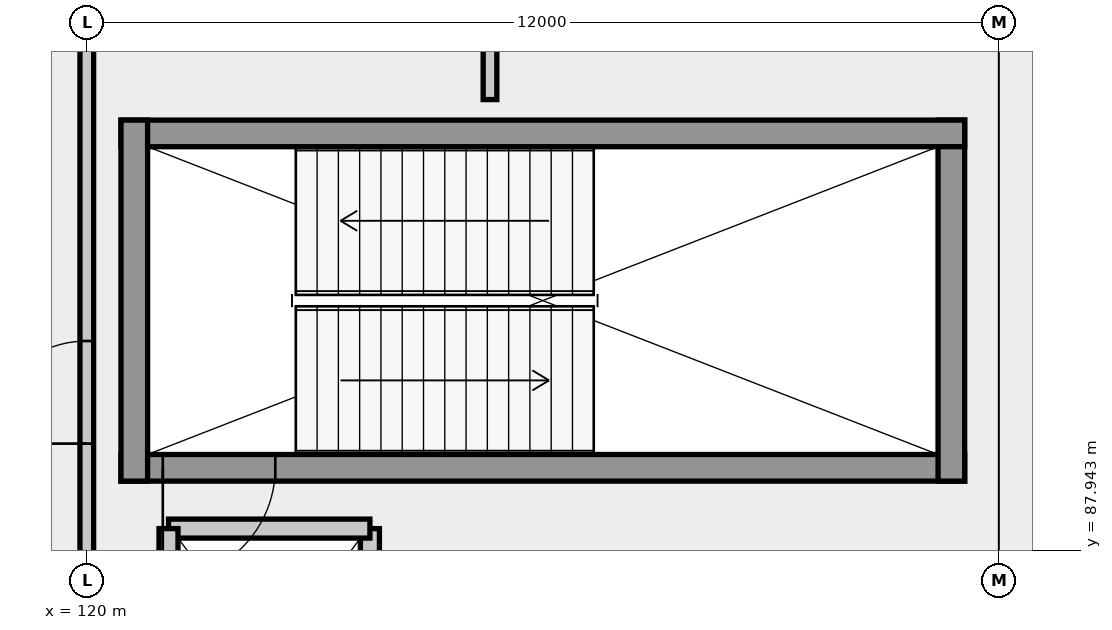
"""IFC4 building model, lengths in metres.
Left out: names, types, materials, properties, quantities, classifications, styles, units other than length and angle.
Written with IfcOpenShell. Run it as: python <this file> out.ifc"""

import sys

from ifc_helpers import new_model, si_unit, direction, frame, frame_2d, origin, place, context, subcontext, project, spatial, rectangle, extrude, element, fill, save


model = new_model("IFC4")
c1 = context("Model", 3, precision=1e-05, world=origin(), true_north=direction((0.0, 1.0)))
c2 = subcontext(c1, "Body", "Model", "MODEL_VIEW")
j1 = project(units=[si_unit("LENGTHUNIT", "METRE"), si_unit("PLANEANGLEUNIT", "RADIAN")], contexts=[c1])
p1 = place(None, origin())
s1 = spatial("IfcSite", under=j1, at=p1, CompositionType="ELEMENT")
p2 = place(p1, origin())
s2 = spatial("IfcBuilding", under=s1, at=p2, CompositionType="ELEMENT")
p3 = place(p2, origin())
s3 = spatial("IfcBuildingStorey", under=s2, at=p3, CompositionType="ELEMENT", Elevation=0.0)
p4 = place(p3, frame((120.45, 89.025, 0.0), z_axis=(0.0, 0.0, 1.0), x_axis=(1.0, 0.0, 0.0)))
e1 = element("IfcWall", 1, at=p4, inside=s3, PredefinedType="SHEAR", context=c2, shape_type="SweptSolid", body=[
    extrude(rectangle(XDim=11.1, YDim=0.35, at=frame_2d((5.55, 0.0))), origin(), (0.0, 0.0, 1.0), 5.14),
])
p5 = place(p4, frame((0.55, 0.0, 0.0)))
e2 = element("IfcOpeningElement", 2, at=p5, cuts=e1, PredefinedType="OPENING", context=c2, shape_type="SweptSolid", body=[
    extrude(rectangle(XDim=1.48, YDim=2.3, at=frame_2d((0.74, 1.15))), frame((0.0, 0.185, 0.0), z_axis=(0.0, -1.0, 0.0), x_axis=(1.0, 0.0, 0.0)), (0.0, 0.0, 1.0), 0.37),
])
p6 = place(p3, frame((131.375, 88.85, 0.0), z_axis=(0.0, 0.0, 1.0), x_axis=(0.0, 1.0, 0.0)))
e3 = element("IfcWall", 3, at=p6, inside=s3, PredefinedType="SHEAR", context=c2, shape_type="SweptSolid", body=[
    extrude(rectangle(XDim=4.75, YDim=0.35, at=frame_2d((2.375, 0.0))), origin(), (0.0, 0.0, 1.0), 5.14),
])
p7 = place(p3, frame((131.55, 93.425, 0.0), z_axis=(0.0, 0.0, 1.0), x_axis=(-1.0, 0.0, 0.0)))
e4 = element("IfcWall", 4, at=p7, inside=s3, PredefinedType="SHEAR", context=c2, shape_type="SweptSolid", body=[
    extrude(rectangle(XDim=11.1, YDim=0.35, at=frame_2d((5.55, 0.0))), origin(), (0.0, 0.0, 1.0), 5.14),
])
p8 = place(p3, frame((120.625, 93.6, 0.0), z_axis=(0.0, 0.0, 1.0), x_axis=(0.0, -1.0, 0.0)))
e5 = element("IfcWall", 5, at=p8, inside=s3, PredefinedType="SHEAR", context=c2, shape_type="SweptSolid", body=[
    extrude(rectangle(XDim=4.75, YDim=0.35, at=frame_2d((2.375, 0.0))), origin(), (0.0, 0.0, 1.0), 5.14),
])
p9 = place(p3, frame((123.725, 84.775, 0.0), z_axis=(0.0, 0.0, 1.0), x_axis=(0.0, 1.0, 0.0)))
e6 = element("IfcWall", 6, at=p9, inside=s3, PredefinedType="SOLIDWALL", context=c2, shape_type="SweptSolid", body=[
    extrude(rectangle(XDim=3.45, YDim=0.25, at=frame_2d((1.725, 0.0))), origin(), (0.0, 0.0, 1.0), 5.14),
])
p10 = place(p9, frame((1.1, 0.0, 0.0)))
e7 = element("IfcOpeningElement", 7, at=p10, cuts=e6, PredefinedType="OPENING", context=c2, shape_type="SweptSolid", body=[
    extrude(rectangle(XDim=1.25, YDim=2.25, at=frame_2d((0.625, 1.125))), frame((0.0, 0.135, 0.0), z_axis=(0.0, -1.0, 0.0), x_axis=(1.0, 0.0, 0.0)), (0.0, 0.0, 1.0), 0.27),
])
p11 = place(p3, frame((123.725, 88.225, 0.0), z_axis=(0.0, 0.0, 1.0), x_axis=(-1.0, 0.0, 0.0)))
e8 = element("IfcWall", 8, at=p11, inside=s3, PredefinedType="SOLIDWALL", context=c2, shape_type="SweptSolid", body=[
    extrude(rectangle(XDim=2.65, YDim=0.25, at=frame_2d((1.325, 0.0))), origin(), (0.0, 0.0, 1.0), 5.14),
])
p12 = place(p3, frame((121.075, 88.225, 0.0), z_axis=(0.0, 0.0, 1.0), x_axis=(0.0, -1.0, 0.0)))
e9 = element("IfcWall", 9, at=p12, inside=s3, PredefinedType="SOLIDWALL", context=c2, shape_type="SweptSolid", body=[
    extrude(rectangle(XDim=3.45, YDim=0.25, at=frame_2d((1.725, 0.0))), origin(), (0.0, 0.0, 1.0), 5.14),
])
p13 = place(p3, frame((120.0, 84.594, 0.0), z_axis=(0.0, 0.0, 1.0), x_axis=(0.0, 1.0, 0.0)))
e10 = element("IfcWall", 10, at=p13, inside=s3, PredefinedType="PARTITIONING", context=c2, shape_type="SweptSolid", body=[
    extrude(rectangle(XDim=10.848, YDim=0.18, at=frame_2d((5.424, 0.0))), origin(), (0.0, 0.0, 1.0), 4.73),
])
p14 = place(p13, frame((4.749, 0.0, 0.0)))
e11 = element("IfcOpeningElement", 11, at=p14, cuts=e10, PredefinedType="OPENING", context=c2, shape_type="SweptSolid", body=[
    extrude(rectangle(XDim=1.35, YDim=2.3, at=frame_2d((0.675, 1.15))), frame((0.0, 0.1, 0.0), z_axis=(0.0, -1.0, 0.0), x_axis=(1.0, 0.0, 0.0)), (0.0, 0.0, 1.0), 0.2),
])
p15 = place(p3, frame((125.305, 93.87, 0.0), z_axis=(0.0, 0.0, 1.0), x_axis=(0.0, 1.0, 0.0)))
e12 = element("IfcWall", 12, at=p15, inside=s3, PredefinedType="PARTITIONING", context=c2, shape_type="SweptSolid", body=[
    extrude(rectangle(XDim=2.61, YDim=0.18, at=frame_2d((1.305, 0.0))), origin(), (0.0, 0.0, 1.0), 4.53),
])
p16 = place(p15, frame((0.65, 0.0, 0.0)))
e13 = element("IfcOpeningElement", 13, at=p16, cuts=e12, PredefinedType="OPENING", context=c2, shape_type="SweptSolid", body=[
    extrude(rectangle(XDim=1.15, YDim=2.25, at=frame_2d((0.575, 1.125))), frame((0.0, 0.1, 0.0), z_axis=(0.0, -1.0, 0.0), x_axis=(1.0, 0.0, 0.0)), (0.0, 0.0, 1.0), 0.2),
])
p17 = place(p5, frame((1.48, 0.0, 0.0), z_axis=(0.0, 0.0, 1.0), x_axis=(-1.0, 0.0, 0.0)))
e14 = element("IfcDoor", 14, at=p17, inside=s3, OperationType="DOUBLE_DOOR_SINGLE_SWING", PredefinedType="DOOR", context=c2, shape_type="SweptSolid", body=[
    extrude(rectangle(XDim=1.48, YDim=2.3, at=frame_2d((0.74, 1.15))), frame((0.0, 0.025, 0.0), z_axis=(0.0, -1.0, 0.0), x_axis=(1.0, 0.0, 0.0)), (0.0, 0.0, 1.0), 0.05),
])
fill(e2, e14)
p18 = place(p14, origin())
e15 = element("IfcDoor", 15, at=p18, inside=s3, OperationType="DOUBLE_SWING_LEFT", PredefinedType="DOOR", context=c2, shape_type="SweptSolid", body=[
    extrude(rectangle(XDim=1.35, YDim=2.3, at=frame_2d((0.675, 1.15))), frame((0.0, 0.025, 0.0), z_axis=(0.0, -1.0, 0.0), x_axis=(1.0, 0.0, 0.0)), (0.0, 0.0, 1.0), 0.05),
])
fill(e11, e15)
save(model, sys.argv[1])
